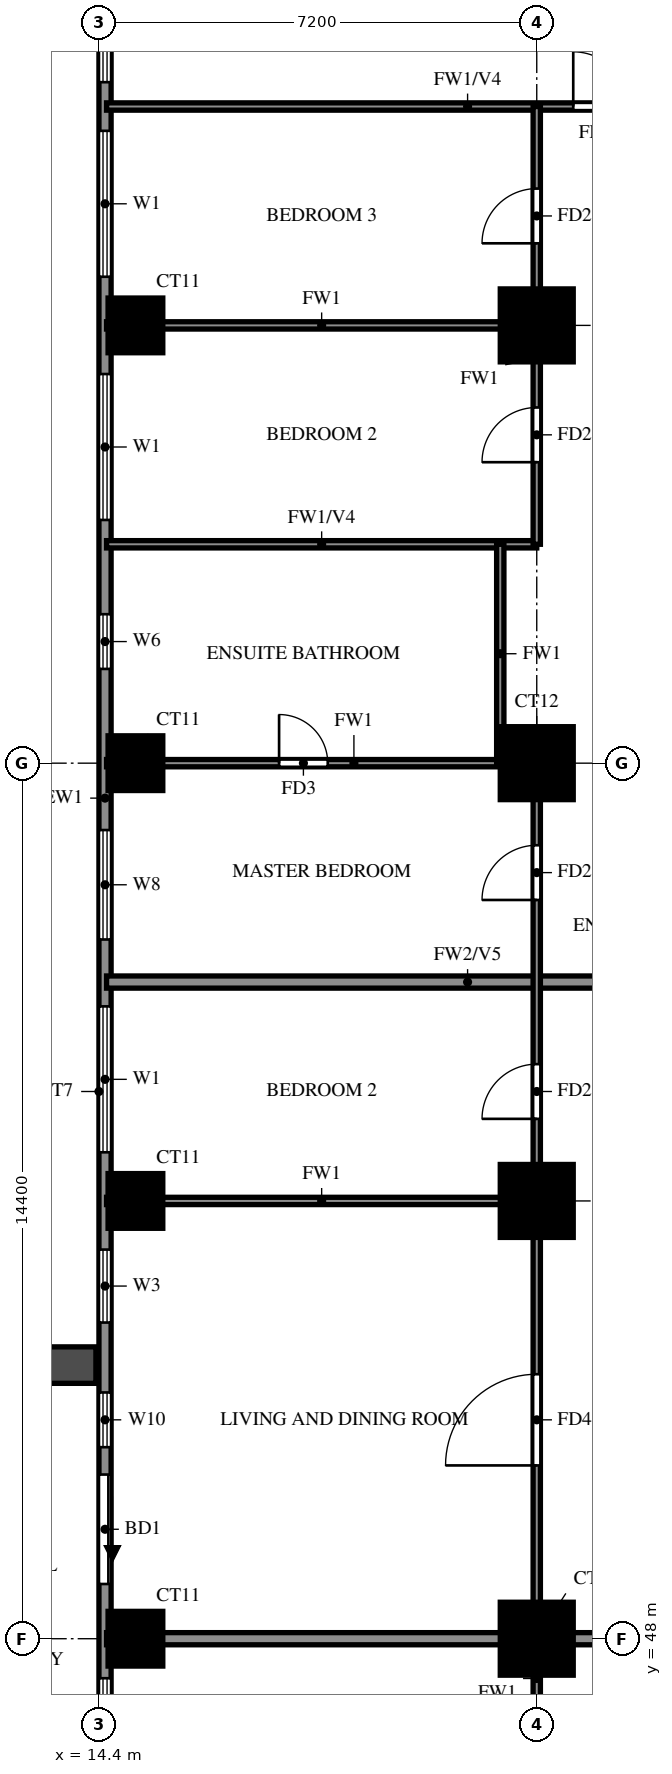
"""IFC4 building model, lengths in metres.
Left out: names, types, materials, properties, quantities, classifications, styles, units other than length and angle.
Written with IfcOpenShell. Run it as: python <this file> out.ifc"""

import sys

from ifc_helpers import new_model, si_unit, direction, frame, frame_2d, origin, origin_2d, place, context, subcontext, project, spatial, rectangle, extrude, source, transform, mapped, element, fill, save


model = new_model("IFC4")
c1 = context("Model", 3, precision=1e-05, world=origin(), true_north=direction((0.0, 1.0)))
c2 = subcontext(c1, "Body", "Model", "MODEL_VIEW")
j1 = project(units=[si_unit("LENGTHUNIT", "METRE"), si_unit("PLANEANGLEUNIT", "RADIAN")], contexts=[c1])
p1 = place(None, origin())
s1 = spatial("IfcSite", under=j1, at=p1, CompositionType="ELEMENT")
p2 = place(p1, origin())
s2 = spatial("IfcBuilding", under=s1, at=p2, CompositionType="ELEMENT")
p3 = place(p2, frame((0.0, 0.0, 97.0)))
s3 = spatial("IfcBuildingStorey", under=s2, at=p3, CompositionType="ELEMENT", Elevation=97.0)
m1 = source(origin(), c2, "Body", "SweptSolid", [
    extrude(rectangle(XDim=0.9, YDim=0.9, at=origin_2d()), origin(), (0.0, 0.0, 1.0), 3.18),
])
p4 = place(p3, frame((15.0, 48.0, 0.0), z_axis=(0.0, 0.0, 1.0), x_axis=(1.0, 0.0, 0.0)))
e1 = element("IfcColumn", 1, at=p4, inside=s3, PredefinedType="COLUMN", context=c2, shape_type="MappedRepresentation", body=[
    mapped(m1, transform((0.0, 0.0, 0.0))),
])
m2 = source(origin(), c2, "Body", "SweptSolid", [
    extrude(rectangle(XDim=1.2, YDim=1.2, at=origin_2d()), origin(), (0.0, 0.0, 1.0), 3.18),
])
p5 = place(p3, frame((21.6, 48.0, 0.0), z_axis=(0.0, 0.0, 1.0), x_axis=(1.0, 0.0, 0.0)))
e2 = element("IfcColumn", 2, at=p5, inside=s3, PredefinedType="COLUMN", context=c2, shape_type="MappedRepresentation", body=[
    mapped(m2, transform((0.0, 0.0, 0.0))),
])
p6 = place(p3, frame((15.0, 55.2, 0.0), z_axis=(0.0, 0.0, 1.0), x_axis=(1.0, 0.0, 0.0)))
e3 = element("IfcColumn", 3, at=p6, inside=s3, PredefinedType="COLUMN", context=c2, shape_type="MappedRepresentation", body=[
    mapped(m1, transform((0.0, 0.0, 0.0))),
])
p7 = place(p3, frame((21.6, 55.2, 0.0), z_axis=(0.0, 0.0, 1.0), x_axis=(1.0, 0.0, 0.0)))
e4 = element("IfcColumn", 4, at=p7, inside=s3, PredefinedType="COLUMN", context=c2, shape_type="MappedRepresentation", body=[
    mapped(m2, transform((0.0, 0.0, 0.0))),
])
p8 = place(p3, frame((15.0, 62.4, 0.0), z_axis=(0.0, 0.0, 1.0), x_axis=(1.0, 0.0, 0.0)))
e5 = element("IfcColumn", 5, at=p8, inside=s3, PredefinedType="COLUMN", context=c2, shape_type="MappedRepresentation", body=[
    mapped(m1, transform((0.0, 0.0, 0.0))),
])
p9 = place(p3, frame((21.6, 62.4, 0.0), z_axis=(0.0, 0.0, 1.0), x_axis=(1.0, 0.0, 0.0)))
e6 = element("IfcColumn", 6, at=p9, inside=s3, PredefinedType="COLUMN", context=c2, shape_type="MappedRepresentation", body=[
    mapped(m2, transform((0.0, 0.0, 0.0))),
])
p10 = place(p3, frame((15.0, 69.6, 0.0), z_axis=(0.0, 0.0, 1.0), x_axis=(1.0, 0.0, 0.0)))
e7 = element("IfcColumn", 7, at=p10, inside=s3, PredefinedType="COLUMN", context=c2, shape_type="MappedRepresentation", body=[
    mapped(m1, transform((0.0, 0.0, 0.0))),
])
p11 = place(p3, frame((21.6, 69.6, 0.0), z_axis=(0.0, 0.0, 1.0), x_axis=(1.0, 0.0, 0.0)))
e8 = element("IfcColumn", 8, at=p11, inside=s3, PredefinedType="COLUMN", context=c2, shape_type="MappedRepresentation", body=[
    mapped(m2, transform((0.0, 0.0, 0.0))),
])
p12 = place(p3, frame((14.5, 76.6, 0.0), z_axis=(0.0, 0.0, 1.0), x_axis=(0.0, -1.0, 0.0)))
e9 = element("IfcWall", 9, at=p12, inside=s3, PredefinedType="SOLIDWALL", context=c2, shape_type="SweptSolid", body=[
    extrude(rectangle(XDim=39.4, YDim=0.2, at=frame_2d((19.7, 0.0))), origin(), (0.0, 0.0, 1.0), 3.18),
])
p13 = place(p12, frame((25.9, 0.0, 0.0)))
e10 = element("IfcOpeningElement", 10, at=p13, cuts=e9, PredefinedType="OPENING", context=c2, shape_type="SweptSolid", body=[
    extrude(rectangle(XDim=1.8, YDim=2.4, at=frame_2d((0.9, 1.2))), frame((0.0, 0.11, 0.0), z_axis=(0.0, -1.0, 0.0), x_axis=(1.0, 0.0, 0.0)), (0.0, 0.0, 1.0), 0.22),
])
p14 = place(p12, frame((29.25, 0.0, 0.6)))
e11 = element("IfcOpeningElement", 11, at=p14, cuts=e9, PredefinedType="OPENING", context=c2, shape_type="SweptSolid", body=[
    extrude(rectangle(XDim=0.9, YDim=2.4, at=frame_2d((0.45, 1.2))), frame((0.0, 0.11, 0.0), z_axis=(0.0, -1.0, 0.0), x_axis=(1.0, 0.0, 0.0)), (0.0, 0.0, 1.0), 0.22),
])
p15 = place(p12, frame((32.0, 0.0, 0.6)))
e12 = element("IfcOpeningElement", 12, at=p15, cuts=e9, PredefinedType="OPENING", context=c2, shape_type="SweptSolid", body=[
    extrude(rectangle(XDim=2.4, YDim=2.4, at=frame_2d((1.2, 1.2))), frame((0.0, 0.11, 0.0), z_axis=(0.0, -1.0, 0.0), x_axis=(1.0, 0.0, 0.0)), (0.0, 0.0, 1.0), 0.22),
])
p16 = place(p12, frame((36.8, 0.0, 0.6)))
e13 = element("IfcOpeningElement", 13, at=p16, cuts=e9, PredefinedType="OPENING", context=c2, shape_type="SweptSolid", body=[
    extrude(rectangle(XDim=1.8, YDim=2.4, at=frame_2d((0.9, 1.2))), frame((0.0, 0.11, 0.0), z_axis=(0.0, -1.0, 0.0), x_axis=(1.0, 0.0, 0.0)), (0.0, 0.0, 1.0), 0.22),
])
p17 = place(p12, frame((22.2, 0.0, 0.6)))
e14 = element("IfcOpeningElement", 14, at=p17, cuts=e9, PredefinedType="OPENING", context=c2, shape_type="SweptSolid", body=[
    extrude(rectangle(XDim=1.2, YDim=2.4, at=frame_2d((0.6, 1.2))), frame((0.0, 0.11, 0.0), z_axis=(0.0, -1.0, 0.0), x_axis=(1.0, 0.0, 0.0)), (0.0, 0.0, 1.0), 0.22),
])
p18 = place(p12, frame((24.55, 0.0, 0.6)))
e15 = element("IfcOpeningElement", 15, at=p18, cuts=e9, PredefinedType="OPENING", context=c2, shape_type="SweptSolid", body=[
    extrude(rectangle(XDim=0.9, YDim=2.4, at=frame_2d((0.45, 1.2))), frame((0.0, 0.11, 0.0), z_axis=(0.0, -1.0, 0.0), x_axis=(1.0, 0.0, 0.0)), (0.0, 0.0, 1.0), 0.22),
])
p19 = place(p12, frame((18.2, 0.0, 0.6)))
e16 = element("IfcOpeningElement", 16, at=p19, cuts=e9, PredefinedType="OPENING", context=c2, shape_type="SweptSolid", body=[
    extrude(rectangle(XDim=2.4, YDim=2.4, at=frame_2d((1.2, 1.2))), frame((0.0, 0.11, 0.0), z_axis=(0.0, -1.0, 0.0), x_axis=(1.0, 0.0, 0.0)), (0.0, 0.0, 1.0), 0.22),
])
p20 = place(p12, frame((15.3, 0.0, 0.6)))
e17 = element("IfcOpeningElement", 17, at=p20, cuts=e9, PredefinedType="OPENING", context=c2, shape_type="SweptSolid", body=[
    extrude(rectangle(XDim=1.8, YDim=2.4, at=frame_2d((0.9, 1.2))), frame((0.0, 0.11, 0.0), z_axis=(0.0, -1.0, 0.0), x_axis=(1.0, 0.0, 0.0)), (0.0, 0.0, 1.0), 0.22),
])
p21 = place(p12, frame((11.75, 0.0, 1.5)))
e18 = element("IfcOpeningElement", 18, at=p21, cuts=e9, PredefinedType="OPENING", context=c2, shape_type="SweptSolid", body=[
    extrude(rectangle(XDim=0.9, YDim=0.9, at=frame_2d((0.45, 0.45))), frame((0.0, 0.11, 0.0), z_axis=(0.0, -1.0, 0.0), x_axis=(1.0, 0.0, 0.0)), (0.0, 0.0, 1.0), 0.22),
])
p22 = place(p12, frame((7.8, 0.0, 0.6)))
e19 = element("IfcOpeningElement", 19, at=p22, cuts=e9, PredefinedType="OPENING", context=c2, shape_type="SweptSolid", body=[
    extrude(rectangle(XDim=2.4, YDim=2.4, at=frame_2d((1.2, 1.2))), frame((0.0, 0.11, 0.0), z_axis=(0.0, -1.0, 0.0), x_axis=(1.0, 0.0, 0.0)), (0.0, 0.0, 1.0), 0.22),
])
p23 = place(p12, frame((3.8, 0.0, 0.6)))
e20 = element("IfcOpeningElement", 20, at=p23, cuts=e9, PredefinedType="OPENING", context=c2, shape_type="SweptSolid", body=[
    extrude(rectangle(XDim=2.4, YDim=2.4, at=frame_2d((1.2, 1.2))), frame((0.0, 0.11, 0.0), z_axis=(0.0, -1.0, 0.0), x_axis=(1.0, 0.0, 0.0)), (0.0, 0.0, 1.0), 0.22),
])
p24 = place(p12, frame((0.6, 0.0, 0.6)))
e21 = element("IfcOpeningElement", 21, at=p24, cuts=e9, PredefinedType="OPENING", context=c2, shape_type="SweptSolid", body=[
    extrude(rectangle(XDim=2.4, YDim=2.4, at=frame_2d((1.2, 1.2))), frame((0.0, 0.11, 0.0), z_axis=(0.0, -1.0, 0.0), x_axis=(1.0, 0.0, 0.0)), (0.0, 0.0, 1.0), 0.22),
])
p25 = place(p3, frame((14.35, 52.5, 0.0), z_axis=(0.0, 0.0, 1.0), x_axis=(-1.0, 0.0, 0.0)))
e22 = element("IfcWall", 22, at=p25, inside=s3, PredefinedType="SOLIDWALL", context=c2, shape_type="SweptSolid", body=[
    extrude(rectangle(XDim=2.65, YDim=0.6, at=frame_2d((1.325, 0.0))), origin(), (0.0, 0.0, 1.0), 2.85),
])
p26 = place(p3, frame((14.525, 48.0, 0.0), z_axis=(0.0, 0.0, 1.0), x_axis=(1.0, 0.0, 0.0)))
e23 = element("IfcWall", 23, at=p26, inside=s3, PredefinedType="SOLIDWALL", context=c2, shape_type="SweptSolid", body=[
    extrude(rectangle(XDim=19.075, YDim=0.2, at=frame_2d((9.538, 0.0))), origin(), (0.0, 0.0, 1.0), 3.18),
])
p27 = place(p3, frame((14.525, 58.8, 0.0), z_axis=(0.0, 0.0, 1.0), x_axis=(1.0, 0.0, 0.0)))
e24 = element("IfcWall", 24, at=p27, inside=s3, PredefinedType="SOLIDWALL", context=c2, shape_type="SweptSolid", body=[
    extrude(rectangle(XDim=11.875, YDim=0.2, at=frame_2d((5.938, 0.0))), origin(), (0.0, 0.0, 1.0), 2.28),
])
p28 = place(p3, frame((14.525, 55.2, 0.0), z_axis=(0.0, 0.0, 1.0), x_axis=(1.0, 0.0, 0.0)))
e25 = element("IfcWall", 25, at=p28, inside=s3, PredefinedType="PARTITIONING", context=c2, shape_type="SweptSolid", body=[
    extrude(rectangle(XDim=7.075, YDim=0.12, at=frame_2d((3.538, 0.0))), origin(), (0.0, 0.0, 1.0), 3.18),
])
p29 = place(p3, frame((14.525, 62.4, 0.0), z_axis=(0.0, 0.0, 1.0), x_axis=(1.0, 0.0, 0.0)))
e26 = element("IfcWall", 26, at=p29, inside=s3, PredefinedType="PARTITIONING", context=c2, shape_type="SweptSolid", body=[
    extrude(rectangle(XDim=7.075, YDim=0.12, at=frame_2d((3.538, 0.0))), origin(), (0.0, 0.0, 1.0), 3.18),
])
p30 = place(p29, frame((2.837, 0.0, 0.0)))
e27 = element("IfcOpeningElement", 27, at=p30, cuts=e26, PredefinedType="OPENING", context=c2, shape_type="SweptSolid", body=[
    extrude(rectangle(XDim=0.8, YDim=2.1, at=frame_2d((0.4, 1.05))), frame((0.0, 0.07, 0.0), z_axis=(0.0, -1.0, 0.0), x_axis=(1.0, 0.0, 0.0)), (0.0, 0.0, 1.0), 0.14),
])
p31 = place(p3, frame((14.525, 66.0, 0.0), z_axis=(0.0, 0.0, 1.0), x_axis=(1.0, 0.0, 0.0)))
e28 = element("IfcWall", 28, at=p31, inside=s3, PredefinedType="PARTITIONING", context=c2, shape_type="SweptSolid", body=[
    extrude(rectangle(XDim=7.075, YDim=0.12, at=frame_2d((3.538, 0.0))), origin(), (0.0, 0.0, 1.0), 2.28),
])
p32 = place(p3, frame((14.525, 69.6, 0.0), z_axis=(0.0, 0.0, 1.0), x_axis=(1.0, 0.0, 0.0)))
e29 = element("IfcWall", 29, at=p32, inside=s3, PredefinedType="PARTITIONING", context=c2, shape_type="SweptSolid", body=[
    extrude(rectangle(XDim=7.075, YDim=0.12, at=frame_2d((3.538, 0.0))), origin(), (0.0, 0.0, 1.0), 3.18),
])
p33 = place(p3, frame((14.525, 73.2, 0.0), z_axis=(0.0, 0.0, 1.0), x_axis=(1.0, 0.0, 0.0)))
e30 = element("IfcWall", 30, at=p33, inside=s3, PredefinedType="PARTITIONING", context=c2, shape_type="SweptSolid", body=[
    extrude(rectangle(XDim=11.875, YDim=0.12, at=frame_2d((5.938, 0.0))), origin(), (0.0, 0.0, 1.0), 2.28),
])
p34 = place(p33, frame((7.675, 0.0, 0.0)))
e31 = element("IfcOpeningElement", 31, at=p34, cuts=e30, PredefinedType="OPENING", context=c2, shape_type="SweptSolid", body=[
    extrude(rectangle(XDim=0.9, YDim=2.1, at=frame_2d((0.45, 1.05))), frame((0.0, 0.07, 0.0), z_axis=(0.0, -1.0, 0.0), x_axis=(1.0, 0.0, 0.0)), (0.0, 0.0, 1.0), 0.14),
])
p35 = place(p3, frame((21.0, 62.4, 0.0), z_axis=(0.0, 0.0, 1.0), x_axis=(0.0, 1.0, 0.0)))
e32 = element("IfcWall", 32, at=p35, inside=s3, PredefinedType="PARTITIONING", context=c2, shape_type="SweptSolid", body=[
    extrude(rectangle(XDim=3.6, YDim=0.12, at=frame_2d((1.8, 0.0))), origin(), (0.0, 0.0, 1.0), 3.18),
])
p36 = place(p3, frame((21.6, 33.725, 0.0), z_axis=(0.0, 0.0, 1.0), x_axis=(0.0, 1.0, 0.0)))
e33 = element("IfcWall", 33, at=p36, inside=s3, PredefinedType="PARTITIONING", context=c2, shape_type="SweptSolid", body=[
    extrude(rectangle(XDim=28.675, YDim=0.12, at=frame_2d((14.337, 0.0))), origin(), (0.0, 0.0, 1.0), 3.18),
])
p37 = place(p36, frame((7.775, 0.0, 0.0)))
e34 = element("IfcOpeningElement", 34, at=p37, cuts=e33, PredefinedType="OPENING", context=c2, shape_type="SweptSolid", body=[
    extrude(rectangle(XDim=0.9, YDim=2.1, at=frame_2d((0.45, 1.05))), frame((0.0, 0.07, 0.0), z_axis=(0.0, -1.0, 0.0), x_axis=(1.0, 0.0, 0.0)), (0.0, 0.0, 1.0), 0.14),
])
p38 = place(p36, frame((17.125, 0.0, 0.0)))
e35 = element("IfcOpeningElement", 35, at=p38, cuts=e33, PredefinedType="OPENING", context=c2, shape_type="SweptSolid", body=[
    extrude(rectangle(XDim=1.5, YDim=2.1, at=frame_2d((0.75, 1.05))), frame((0.0, 0.07, 0.0), z_axis=(0.0, -1.0, 0.0), x_axis=(1.0, 0.0, 0.0)), (0.0, 0.0, 1.0), 0.14),
])
p39 = place(p36, frame((22.825, 0.0, 0.0)))
e36 = element("IfcOpeningElement", 36, at=p39, cuts=e33, PredefinedType="OPENING", context=c2, shape_type="SweptSolid", body=[
    extrude(rectangle(XDim=0.9, YDim=2.1, at=frame_2d((0.45, 1.05))), frame((0.0, 0.07, 0.0), z_axis=(0.0, -1.0, 0.0), x_axis=(1.0, 0.0, 0.0)), (0.0, 0.0, 1.0), 0.14),
])
p40 = place(p36, frame((26.425, 0.0, 0.0)))
e37 = element("IfcOpeningElement", 37, at=p40, cuts=e33, PredefinedType="OPENING", context=c2, shape_type="SweptSolid", body=[
    extrude(rectangle(XDim=0.9, YDim=2.1, at=frame_2d((0.45, 1.05))), frame((0.0, 0.07, 0.0), z_axis=(0.0, -1.0, 0.0), x_axis=(1.0, 0.0, 0.0)), (0.0, 0.0, 1.0), 0.14),
])
p41 = place(p3, frame((21.6, 66.0, 0.0), z_axis=(0.0, 0.0, 1.0), x_axis=(0.0, 1.0, 0.0)))
e38 = element("IfcWall", 38, at=p41, inside=s3, PredefinedType="PARTITIONING", context=c2, shape_type="SweptSolid", body=[
    extrude(rectangle(XDim=7.2, YDim=0.12, at=frame_2d((3.6, 0.0))), origin(), (0.0, 0.0, 1.0), 3.18),
])
p42 = place(p41, frame((1.35, 0.0, 0.0)))
e39 = element("IfcOpeningElement", 39, at=p42, cuts=e38, PredefinedType="OPENING", context=c2, shape_type="SweptSolid", body=[
    extrude(rectangle(XDim=0.9, YDim=2.1, at=frame_2d((0.45, 1.05))), frame((0.0, 0.07, 0.0), z_axis=(0.0, -1.0, 0.0), x_axis=(1.0, 0.0, 0.0)), (0.0, 0.0, 1.0), 0.14),
])
p43 = place(p41, frame((4.95, 0.0, 0.0)))
e40 = element("IfcOpeningElement", 40, at=p43, cuts=e38, PredefinedType="OPENING", context=c2, shape_type="SweptSolid", body=[
    extrude(rectangle(XDim=0.9, YDim=2.1, at=frame_2d((0.45, 1.05))), frame((0.0, 0.07, 0.0), z_axis=(0.0, -1.0, 0.0), x_axis=(1.0, 0.0, 0.0)), (0.0, 0.0, 1.0), 0.14),
])
p44 = place(p13, origin())
e41 = element("IfcDoor", 41, at=p44, inside=s3, OperationType="DOUBLE_DOOR_SLIDING", PredefinedType="DOOR", context=c2, shape_type="SweptSolid", body=[
    extrude(rectangle(XDim=1.8, YDim=2.4, at=frame_2d((0.9, 1.2))), frame((0.0, 0.025, 0.0), z_axis=(0.0, -1.0, 0.0), x_axis=(1.0, 0.0, 0.0)), (0.0, 0.0, 1.0), 0.05),
])
fill(e10, e41)
p45 = place(p14, origin())
e42 = element("IfcWindow", 42, at=p45, inside=s3, PartitioningType="SINGLE_PANEL", PredefinedType="WINDOW", context=c2, shape_type="SweptSolid", body=[
    extrude(rectangle(XDim=0.9, YDim=2.4, at=frame_2d((0.45, 1.2))), frame((0.0, 0.03, 0.0), z_axis=(0.0, -1.0, 0.0), x_axis=(1.0, 0.0, 0.0)), (0.0, 0.0, 1.0), 0.06),
])
fill(e11, e42)
p46 = place(p17, origin())
e43 = element("IfcWindow", 43, at=p46, inside=s3, PartitioningType="SINGLE_PANEL", PredefinedType="WINDOW", context=c2, shape_type="SweptSolid", body=[
    extrude(rectangle(XDim=1.2, YDim=2.4, at=frame_2d((0.6, 1.2))), frame((0.0, 0.03, 0.0), z_axis=(0.0, -1.0, 0.0), x_axis=(1.0, 0.0, 0.0)), (0.0, 0.0, 1.0), 0.06),
])
fill(e14, e43)
p47 = place(p18, origin())
e44 = element("IfcWindow", 44, at=p47, inside=s3, PartitioningType="SINGLE_PANEL", PredefinedType="WINDOW", context=c2, shape_type="SweptSolid", body=[
    extrude(rectangle(XDim=0.9, YDim=2.4, at=frame_2d((0.45, 1.2))), frame((0.0, 0.03, 0.0), z_axis=(0.0, -1.0, 0.0), x_axis=(1.0, 0.0, 0.0)), (0.0, 0.0, 1.0), 0.06),
])
fill(e15, e44)
p48 = place(p19, origin())
e45 = element("IfcWindow", 45, at=p48, inside=s3, PartitioningType="DOUBLE_PANEL_VERTICAL", PredefinedType="WINDOW", context=c2, shape_type="SweptSolid", body=[
    extrude(rectangle(XDim=2.4, YDim=2.4, at=frame_2d((1.2, 1.2))), frame((0.0, 0.03, 0.0), z_axis=(0.0, -1.0, 0.0), x_axis=(1.0, 0.0, 0.0)), (0.0, 0.0, 1.0), 0.06),
])
fill(e16, e45)
p49 = place(p20, origin())
e46 = element("IfcWindow", 46, at=p49, inside=s3, PartitioningType="DOUBLE_PANEL_VERTICAL", PredefinedType="WINDOW", context=c2, shape_type="SweptSolid", body=[
    extrude(rectangle(XDim=1.8, YDim=2.4, at=frame_2d((0.9, 1.2))), frame((0.0, 0.03, 0.0), z_axis=(0.0, -1.0, 0.0), x_axis=(1.0, 0.0, 0.0)), (0.0, 0.0, 1.0), 0.06),
])
fill(e17, e46)
p50 = place(p21, origin())
e47 = element("IfcWindow", 47, at=p50, inside=s3, PartitioningType="SINGLE_PANEL", PredefinedType="WINDOW", context=c2, shape_type="SweptSolid", body=[
    extrude(rectangle(XDim=0.9, YDim=0.9, at=frame_2d((0.45, 0.45))), frame((0.0, 0.03, 0.0), z_axis=(0.0, -1.0, 0.0), x_axis=(1.0, 0.0, 0.0)), (0.0, 0.0, 1.0), 0.06),
])
fill(e18, e47)
p51 = place(p22, origin())
e48 = element("IfcWindow", 48, at=p51, inside=s3, PartitioningType="DOUBLE_PANEL_VERTICAL", PredefinedType="WINDOW", context=c2, shape_type="SweptSolid", body=[
    extrude(rectangle(XDim=2.4, YDim=2.4, at=frame_2d((1.2, 1.2))), frame((0.0, 0.03, 0.0), z_axis=(0.0, -1.0, 0.0), x_axis=(1.0, 0.0, 0.0)), (0.0, 0.0, 1.0), 0.06),
])
fill(e19, e48)
p52 = place(p23, origin())
e49 = element("IfcWindow", 49, at=p52, inside=s3, PartitioningType="DOUBLE_PANEL_VERTICAL", PredefinedType="WINDOW", context=c2, shape_type="SweptSolid", body=[
    extrude(rectangle(XDim=2.4, YDim=2.4, at=frame_2d((1.2, 1.2))), frame((0.0, 0.03, 0.0), z_axis=(0.0, -1.0, 0.0), x_axis=(1.0, 0.0, 0.0)), (0.0, 0.0, 1.0), 0.06),
])
fill(e20, e49)
p53 = place(p24, origin())
e50 = element("IfcWindow", 50, at=p53, inside=s3, PartitioningType="DOUBLE_PANEL_VERTICAL", PredefinedType="WINDOW", context=c2, shape_type="SweptSolid", body=[
    extrude(rectangle(XDim=2.4, YDim=2.4, at=frame_2d((1.2, 1.2))), frame((0.0, 0.03, 0.0), z_axis=(0.0, -1.0, 0.0), x_axis=(1.0, 0.0, 0.0)), (0.0, 0.0, 1.0), 0.06),
])
fill(e21, e50)
p54 = place(p38, origin())
e51 = element("IfcDoor", 51, at=p54, inside=s3, OperationType="SINGLE_SWING_RIGHT", PredefinedType="DOOR", context=c2, shape_type="SweptSolid", body=[
    extrude(rectangle(XDim=1.5, YDim=2.1, at=frame_2d((0.75, 1.05))), frame((0.0, 0.025, 0.0), z_axis=(0.0, -1.0, 0.0), x_axis=(1.0, 0.0, 0.0)), (0.0, 0.0, 1.0), 0.05),
])
fill(e35, e51)
p55 = place(p39, origin())
e52 = element("IfcDoor", 52, at=p55, inside=s3, OperationType="SINGLE_SWING_LEFT", PredefinedType="DOOR", context=c2, shape_type="SweptSolid", body=[
    extrude(rectangle(XDim=0.9, YDim=2.1, at=frame_2d((0.45, 1.05))), frame((0.0, 0.025, 0.0), z_axis=(0.0, -1.0, 0.0), x_axis=(1.0, 0.0, 0.0)), (0.0, 0.0, 1.0), 0.05),
])
fill(e36, e52)
p56 = place(p40, origin())
e53 = element("IfcDoor", 53, at=p56, inside=s3, OperationType="SINGLE_SWING_RIGHT", PredefinedType="DOOR", context=c2, shape_type="SweptSolid", body=[
    extrude(rectangle(XDim=0.9, YDim=2.1, at=frame_2d((0.45, 1.05))), frame((0.0, 0.025, 0.0), z_axis=(0.0, -1.0, 0.0), x_axis=(1.0, 0.0, 0.0)), (0.0, 0.0, 1.0), 0.05),
])
fill(e37, e53)
p57 = place(p30, origin())
e54 = element("IfcDoor", 54, at=p57, inside=s3, OperationType="SINGLE_SWING_LEFT", PredefinedType="DOOR", context=c2, shape_type="SweptSolid", body=[
    extrude(rectangle(XDim=0.8, YDim=2.1, at=frame_2d((0.4, 1.05))), frame((0.0, 0.025, 0.0), z_axis=(0.0, -1.0, 0.0), x_axis=(1.0, 0.0, 0.0)), (0.0, 0.0, 1.0), 0.05),
])
fill(e27, e54)
p58 = place(p42, origin())
e55 = element("IfcDoor", 55, at=p58, inside=s3, OperationType="SINGLE_SWING_LEFT", PredefinedType="DOOR", context=c2, shape_type="SweptSolid", body=[
    extrude(rectangle(XDim=0.9, YDim=2.1, at=frame_2d((0.45, 1.05))), frame((0.0, 0.025, 0.0), z_axis=(0.0, -1.0, 0.0), x_axis=(1.0, 0.0, 0.0)), (0.0, 0.0, 1.0), 0.05),
])
fill(e39, e55)
p59 = place(p43, origin())
e56 = element("IfcDoor", 56, at=p59, inside=s3, OperationType="SINGLE_SWING_RIGHT", PredefinedType="DOOR", context=c2, shape_type="SweptSolid", body=[
    extrude(rectangle(XDim=0.9, YDim=2.1, at=frame_2d((0.45, 1.05))), frame((0.0, 0.025, 0.0), z_axis=(0.0, -1.0, 0.0), x_axis=(1.0, 0.0, 0.0)), (0.0, 0.0, 1.0), 0.05),
])
fill(e40, e56)
p60 = place(p34, origin())
e57 = element("IfcDoor", 57, at=p60, inside=s3, OperationType="SINGLE_SWING_LEFT", PredefinedType="DOOR", context=c2, shape_type="SweptSolid", body=[
    extrude(rectangle(XDim=0.9, YDim=2.1, at=frame_2d((0.45, 1.05))), frame((0.0, 0.025, 0.0), z_axis=(0.0, -1.0, 0.0), x_axis=(1.0, 0.0, 0.0)), (0.0, 0.0, 1.0), 0.05),
])
fill(e31, e57)
save(model, sys.argv[1])
